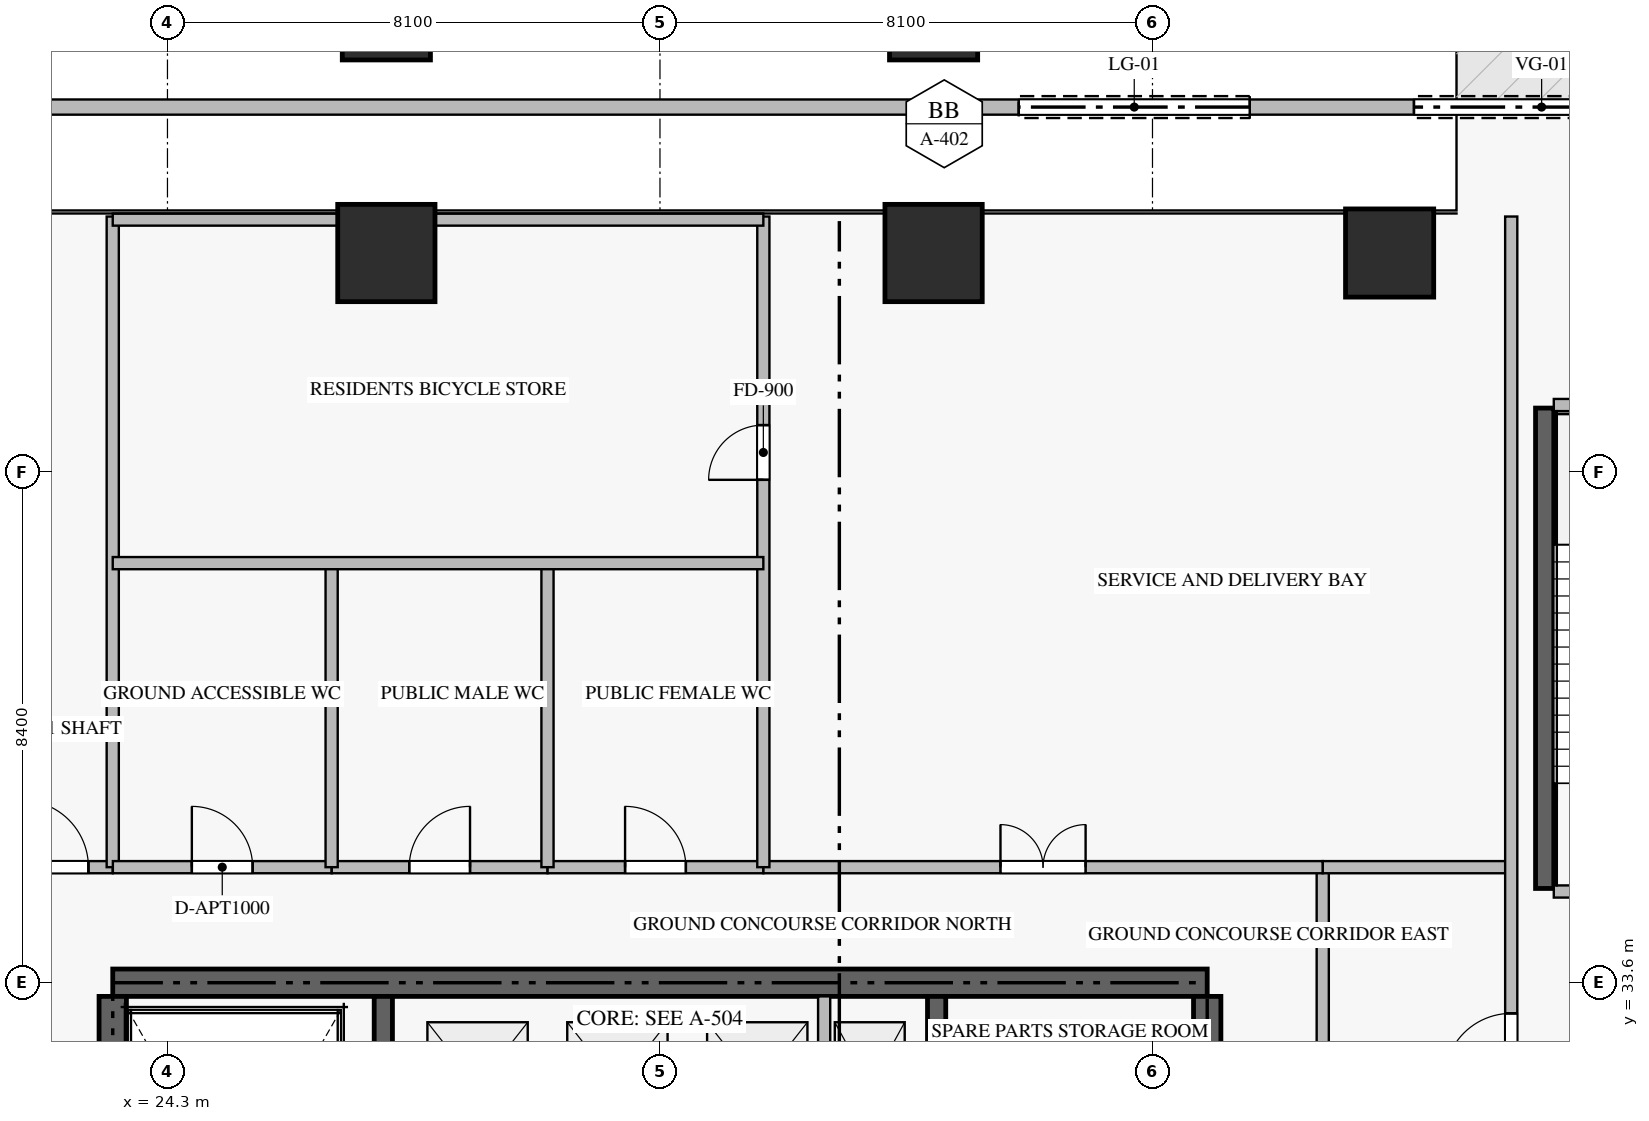
"""IFC4 building model, lengths in metres.
Left out: names, types, materials, properties, quantities, classifications, styles, units other than length and angle.
Written with IfcOpenShell. Run it as: python <this file> out.ifc"""

import sys

from ifc_helpers import new_model, si_unit, direction, frame, frame_2d, origin, origin_2d, place, context, subcontext, project, spatial, rectangle, extrude, source, transform, mapped, element, fill, save


model = new_model("IFC4")
c1 = context("Model", 3, precision=1e-05, world=origin(), true_north=direction((0.0, 1.0)))
c2 = subcontext(c1, "Body", "Model", "MODEL_VIEW")
j1 = project(units=[si_unit("LENGTHUNIT", "METRE"), si_unit("PLANEANGLEUNIT", "RADIAN")], contexts=[c1])
p1 = place(None, origin())
s1 = spatial("IfcSite", under=j1, at=p1, CompositionType="ELEMENT")
p2 = place(p1, origin())
s2 = spatial("IfcBuilding", under=s1, at=p2, CompositionType="ELEMENT")
p3 = place(p2, origin())
s3 = spatial("IfcBuildingStorey", under=s2, at=p3, CompositionType="ELEMENT", Elevation=0.0)
p4 = place(p3, frame((41.4, 33.6, -0.38), z_axis=(0.0, 0.0, 1.0), x_axis=(-1.0, 0.0, 0.0)))
e1 = element("IfcWall", 1, at=p4, inside=s3, PredefinedType="SHEAR", context=c2, shape_type="SweptSolid", body=[
    extrude(rectangle(XDim=18.0, YDim=0.45, at=frame_2d((9.0, 0.0))), origin(), (0.0, 0.0, 1.0), 5.498),
])
p5 = place(p3, frame((23.4, 24.25, -0.38), z_axis=(0.0, 0.0, 1.0), x_axis=(0.0, 1.0, 0.0)))
e2 = element("IfcWall", 2, at=p5, inside=s3, PredefinedType="SHEAR", context=c2, shape_type="SweptSolid", body=[
    extrude(rectangle(XDim=9.125, YDim=0.45, at=frame_2d((4.562, 0.0))), origin(), (0.0, 0.0, 1.0), 5.498),
])
p6 = place(p3, frame((41.4, 27.75, -0.38), z_axis=(0.0, 0.0, 1.0), x_axis=(0.0, 1.0, 0.0)))
e3 = element("IfcWall", 3, at=p6, inside=s3, PredefinedType="SHEAR", context=c2, shape_type="SweptSolid", body=[
    extrude(rectangle(XDim=5.625, YDim=0.45, at=frame_2d((2.812, 0.0))), origin(), (0.0, 0.0, 1.0), 5.498),
])
p7 = place(p3, frame((27.85, 23.55, -0.38), z_axis=(0.0, 0.0, 1.0), x_axis=(0.0, 1.0, 0.0)))
e4 = element("IfcWall", 4, at=p7, inside=s3, PredefinedType="SHEAR", context=c2, shape_type="SweptSolid", body=[
    extrude(rectangle(XDim=9.825, YDim=0.3, at=frame_2d((4.913, 0.0))), origin(), (0.0, 0.0, 1.0), 5.498),
])
p8 = place(p3, frame((36.95, 27.05, -0.38), z_axis=(0.0, 0.0, 1.0), x_axis=(0.0, 1.0, 0.0)))
e5 = element("IfcWall", 5, at=p8, inside=s3, PredefinedType="SHEAR", context=c2, shape_type="SweptSolid", body=[
    extrude(rectangle(XDim=6.325, YDim=0.3, at=frame_2d((3.163, 0.0))), origin(), (0.0, 0.0, 1.0), 5.498),
])
m1 = source(origin(), c2, "Body", "SweptSolid", [
    extrude(rectangle(XDim=1.6, YDim=1.6, at=origin_2d()), origin(), (0.0, 0.0, 1.0), 5.5),
])
for number, where, z_axis, x_axis in (
    (6, (27.9, 45.6, -0.38), (0.0, 0.0, 1.0), (1.0, 0.0, 0.0)),
    (7, (36.9, 45.6, -0.38), (0.0, 0.0, 1.0), (1.0, 0.0, 0.0)),
):
    element("IfcColumn", number, at=place(p3, frame(where, z_axis=z_axis, x_axis=x_axis)), inside=s3, PredefinedType="COLUMN", context=c2, shape_type="MappedRepresentation", body=[
        mapped(m1, transform((0.0, 0.0, 0.0), scale=1.0)),
    ])
m2 = source(origin(), c2, "Body", "SweptSolid", [
    extrude(rectangle(XDim=1.45, YDim=1.45, at=origin_2d()), origin(), (0.0, 0.0, 1.0), 5.5),
])
for number, where, z_axis, x_axis in (
    (8, (44.4, 45.6, -0.38), (0.0, 0.0, 1.0), (1.0, 0.0, 0.0)),
    (9, (27.9, 49.5, -0.38), (0.0, 0.0, 1.0), (1.0, 0.0, 0.0)),
    (10, (36.9, 49.5, -0.38), (0.0, 0.0, 1.0), (1.0, 0.0, 0.0)),
):
    element("IfcColumn", number, at=place(p3, frame(where, z_axis=z_axis, x_axis=x_axis)), inside=s3, PredefinedType="COLUMN", context=c2, shape_type="MappedRepresentation", body=[
        mapped(m2, transform((0.0, 0.0, 0.0), scale=1.0)),
    ])
p9 = place(p3, frame((56.825, 48.0, 0.0), z_axis=(0.0, 0.0, 1.0), x_axis=(-1.0, 0.0, 0.0)))
e11 = element("IfcWall", 11, at=p9, inside=s3, PredefinedType="ELEMENTEDWALL", context=c2, shape_type="SweptSolid", body=[
    extrude(rectangle(XDim=48.85, YDim=0.25, at=frame_2d((24.425, 0.0))), origin(), (0.0, 0.0, 1.0), 5.105),
])
p10 = place(p9, frame((7.825, 0.0, 0.0)))
e12 = element("IfcOpeningElement", 12, at=p10, cuts=e11, PredefinedType="OPENING", context=c2, shape_type="SweptSolid", body=[
    extrude(rectangle(XDim=4.2, YDim=3.1, at=frame_2d((2.1, 1.55))), frame((0.0, 0.135, 0.0), z_axis=(0.0, -1.0, 0.0), x_axis=(1.0, 0.0, 0.0)), (0.0, 0.0, 1.0), 0.27),
])
p11 = place(p9, frame((14.725, 0.0, 0.0)))
e13 = element("IfcOpeningElement", 13, at=p11, cuts=e11, PredefinedType="OPENING", context=c2, shape_type="SweptSolid", body=[
    extrude(rectangle(XDim=3.8, YDim=3.4, at=frame_2d((1.9, 1.7))), frame((0.0, 0.135, 0.0), z_axis=(0.0, -1.0, 0.0), x_axis=(1.0, 0.0, 0.0)), (0.0, 0.0, 1.0), 0.27),
])
p12 = place(p9, frame((38.825, 0.0, 0.0)))
e14 = element("IfcOpeningElement", 14, at=p12, cuts=e11, PredefinedType="OPENING", context=c2, shape_type="SweptSolid", body=[
    extrude(rectangle(XDim=1.8, YDim=2.3, at=frame_2d((0.9, 1.15))), frame((0.0, 0.135, 0.0), z_axis=(0.0, -1.0, 0.0), x_axis=(1.0, 0.0, 0.0)), (0.0, 0.0, 1.0), 0.27),
])
p13 = place(p9, frame((2.425, 0.0, 0.0)))
e15 = element("IfcOpeningElement", 15, at=p13, cuts=e11, PredefinedType="OPENING", context=c2, shape_type="SweptSolid", body=[
    extrude(rectangle(XDim=1.8, YDim=2.3, at=frame_2d((0.9, 1.15))), frame((0.0, 0.135, 0.0), z_axis=(0.0, -1.0, 0.0), x_axis=(1.0, 0.0, 0.0)), (0.0, 0.0, 1.0), 0.27),
])
p14 = place(p3, frame((46.95, 35.15, -0.38), z_axis=(0.0, 0.0, 1.0), x_axis=(0.0, 1.0, 0.0)))
e16 = element("IfcWall", 16, at=p14, inside=s3, PredefinedType="SHEAR", context=c2, shape_type="SweptSolid", body=[
    extrude(rectangle(XDim=7.9, YDim=0.3, at=frame_2d((3.95, 0.0))), origin(), (0.0, 0.0, 1.0), 5.498),
])
p15 = place(p3, frame((47.1, 35.1, 0.0), z_axis=(0.0, 0.0, 1.0), x_axis=(1.0, 0.0, 0.0)))
e17 = element("IfcWall", 17, at=p15, inside=s3, PredefinedType="STANDARD", context=c2, shape_type="SweptSolid", body=[
    extrude(rectangle(XDim=3.5, YDim=0.2, at=frame_2d((1.75, 0.0))), origin(), (0.0, 0.0, 1.0), 5.12),
])
p16 = place(p15, frame((1.2, 0.0, 0.0)))
e18 = element("IfcOpeningElement", 18, at=p16, cuts=e17, PredefinedType="OPENING", context=c2, shape_type="SweptSolid", body=[
    extrude(rectangle(XDim=1.1, YDim=2.15, at=frame_2d((0.55, 1.075))), frame((0.0, 0.11, 0.0), z_axis=(0.0, -1.0, 0.0), x_axis=(1.0, 0.0, 0.0)), (0.0, 0.0, 1.0), 0.22),
])
p17 = place(p3, frame((47.1, 43.1, 0.0), z_axis=(0.0, 0.0, 1.0), x_axis=(1.0, 0.0, 0.0)))
e19 = element("IfcWall", 19, at=p17, inside=s3, PredefinedType="STANDARD", context=c2, shape_type="SweptSolid", body=[
    extrude(rectangle(XDim=3.5, YDim=0.2, at=frame_2d((1.75, 0.0))), origin(), (0.0, 0.0, 1.0), 2.235),
])
p18 = place(p3, frame((35.1, 30.75, 0.0), z_axis=(0.0, 0.0, 1.0), x_axis=(0.0, 1.0, 0.0)))
e20 = element("IfcWall", 20, at=p18, inside=s3, PredefinedType="STANDARD", context=c2, shape_type="SweptSolid", body=[
    extrude(rectangle(XDim=2.625, YDim=0.2, at=frame_2d((1.312, 0.0))), origin(), (0.0, 0.0, 1.0), 5.12),
])
p19 = place(p3, frame((21.5, 35.5, 0.0), z_axis=(0.0, 0.0, 1.0), x_axis=(1.0, 0.0, 0.0)))
e21 = element("IfcWall", 21, at=p19, inside=s3, PredefinedType="STANDARD", context=c2, shape_type="SweptSolid", body=[
    extrude(rectangle(XDim=1.9, YDim=0.2, at=frame_2d((0.95, 0.0))), origin(), (0.0, 0.0, 1.0), 5.12),
])
p20 = place(p19, frame((0.4, 0.0, 0.0)))
e22 = element("IfcOpeningElement", 22, at=p20, cuts=e21, PredefinedType="OPENING", context=c2, shape_type="SweptSolid", body=[
    extrude(rectangle(XDim=1.1, YDim=2.15, at=frame_2d((0.55, 1.075))), frame((0.0, 0.11, 0.0), z_axis=(0.0, -1.0, 0.0), x_axis=(1.0, 0.0, 0.0)), (0.0, 0.0, 1.0), 0.22),
])
p21 = place(p3, frame((23.4, 35.5, 0.0), z_axis=(0.0, 0.0, 1.0), x_axis=(0.0, 1.0, 0.0)))
e23 = element("IfcWall", 23, at=p21, inside=s3, PredefinedType="STANDARD", context=c2, shape_type="SweptSolid", body=[
    extrude(rectangle(XDim=10.7, YDim=0.2, at=frame_2d((5.35, 0.0))), origin(), (0.0, 0.0, 1.0), 5.12),
])
p22 = place(p3, frame((43.3, 28.302, 0.0), z_axis=(0.0, 0.0, 1.0), x_axis=(0.0, 1.0, 0.0)))
e24 = element("IfcWall", 24, at=p22, inside=s3, PredefinedType="STANDARD", context=c2, shape_type="SweptSolid", body=[
    extrude(rectangle(XDim=7.198, YDim=0.2, at=frame_2d((3.599, 0.0))), origin(), (0.0, 0.0, 1.0), 5.12),
])
p23 = place(p22, frame((2.899, 0.0, 0.0)))
e25 = element("IfcOpeningElement", 25, at=p23, cuts=e24, PredefinedType="OPENING", context=c2, shape_type="SweptSolid", body=[
    extrude(rectangle(XDim=1.4, YDim=2.2, at=frame_2d((0.7, 1.1))), frame((0.0, 0.11, 0.0), z_axis=(0.0, -1.0, 0.0), x_axis=(1.0, 0.0, 0.0)), (0.0, 0.0, 1.0), 0.22),
])
p24 = place(p3, frame((43.3, 35.5, 0.0), z_axis=(0.0, 0.0, 1.0), x_axis=(1.0, 0.0, 0.0)))
e26 = element("IfcWall", 26, at=p24, inside=s3, PredefinedType="STANDARD", context=c2, shape_type="SweptSolid", body=[
    extrude(rectangle(XDim=3.1, YDim=0.2, at=frame_2d((1.55, 0.0))), origin(), (0.0, 0.0, 1.0), 5.12),
])
p25 = place(p3, frame((46.4, 28.3, 0.0), z_axis=(0.0, 0.0, 1.0), x_axis=(0.0, 1.0, 0.0)))
e27 = element("IfcWall", 27, at=p25, inside=s3, PredefinedType="STANDARD", context=c2, shape_type="SweptSolid", body=[
    extrude(rectangle(XDim=17.9, YDim=0.2, at=frame_2d((8.95, 0.0))), origin(), (0.0, 0.0, 1.0), 5.12),
])
p26 = place(p25, frame((3.696, 0.0, 0.0)))
e28 = element("IfcOpeningElement", 28, at=p26, cuts=e27, PredefinedType="OPENING", context=c2, shape_type="SweptSolid", body=[
    extrude(rectangle(XDim=1.1, YDim=2.15, at=frame_2d((0.55, 1.075))), frame((0.0, 0.11, 0.0), z_axis=(0.0, -1.0, 0.0), x_axis=(1.0, 0.0, 0.0)), (0.0, 0.0, 1.0), 0.22),
])
p27 = place(p3, frame((23.402, 35.5, 0.0), z_axis=(0.0, 0.0, 1.0), x_axis=(1.0, 0.0, 0.0)))
e29 = element("IfcWall", 29, at=p27, inside=s3, PredefinedType="STANDARD", context=c2, shape_type="SweptSolid", body=[
    extrude(rectangle(XDim=3.598, YDim=0.2, at=frame_2d((1.799, 0.0))), origin(), (0.0, 0.0, 1.0), 5.12),
])
p28 = place(p27, frame((1.299, 0.0, 0.0)))
e30 = element("IfcOpeningElement", 30, at=p28, cuts=e29, PredefinedType="OPENING", context=c2, shape_type="SweptSolid", body=[
    extrude(rectangle(XDim=1.0, YDim=2.15, at=frame_2d((0.5, 1.075))), frame((0.0, 0.11, 0.0), z_axis=(0.0, -1.0, 0.0), x_axis=(1.0, 0.0, 0.0)), (0.0, 0.0, 1.0), 0.22),
])
p29 = place(p3, frame((27.002, 35.5, 0.0), z_axis=(0.0, 0.0, 1.0), x_axis=(1.0, 0.0, 0.0)))
e31 = element("IfcWall", 31, at=p29, inside=s3, PredefinedType="STANDARD", context=c2, shape_type="SweptSolid", body=[
    extrude(rectangle(XDim=3.548, YDim=0.2, at=frame_2d((1.774, 0.0))), origin(), (0.0, 0.0, 1.0), 5.12),
])
p30 = place(p29, frame((1.274, 0.0, 0.0)))
e32 = element("IfcOpeningElement", 32, at=p30, cuts=e31, PredefinedType="OPENING", context=c2, shape_type="SweptSolid", body=[
    extrude(rectangle(XDim=1.0, YDim=2.15, at=frame_2d((0.5, 1.075))), frame((0.0, 0.11, 0.0), z_axis=(0.0, -1.0, 0.0), x_axis=(1.0, 0.0, 0.0)), (0.0, 0.0, 1.0), 0.22),
])
p31 = place(p3, frame((30.552, 35.5, 0.0), z_axis=(0.0, 0.0, 1.0), x_axis=(1.0, 0.0, 0.0)))
e33 = element("IfcWall", 33, at=p31, inside=s3, PredefinedType="STANDARD", context=c2, shape_type="SweptSolid", body=[
    extrude(rectangle(XDim=3.548, YDim=0.2, at=frame_2d((1.774, 0.0))), origin(), (0.0, 0.0, 1.0), 5.12),
])
p32 = place(p31, frame((1.274, 0.0, 0.0)))
e34 = element("IfcOpeningElement", 34, at=p32, cuts=e33, PredefinedType="OPENING", context=c2, shape_type="SweptSolid", body=[
    extrude(rectangle(XDim=1.0, YDim=2.15, at=frame_2d((0.5, 1.075))), frame((0.0, 0.11, 0.0), z_axis=(0.0, -1.0, 0.0), x_axis=(1.0, 0.0, 0.0)), (0.0, 0.0, 1.0), 0.22),
])
p33 = place(p3, frame((34.102, 35.5, 0.0), z_axis=(0.0, 0.0, 1.0), x_axis=(1.0, 0.0, 0.0)))
e35 = element("IfcWall", 35, at=p33, inside=s3, PredefinedType="STANDARD", context=c2, shape_type="SweptSolid", body=[
    extrude(rectangle(XDim=9.196, YDim=0.2, at=frame_2d((4.598, 0.0))), origin(), (0.0, 0.0, 1.0), 5.12),
])
p34 = place(p33, frame((3.898, 0.0, 0.0)))
e36 = element("IfcOpeningElement", 36, at=p34, cuts=e35, PredefinedType="OPENING", context=c2, shape_type="SweptSolid", body=[
    extrude(rectangle(XDim=1.4, YDim=2.2, at=frame_2d((0.7, 1.1))), frame((0.0, 0.11, 0.0), z_axis=(0.0, -1.0, 0.0), x_axis=(1.0, 0.0, 0.0)), (0.0, 0.0, 1.0), 0.22),
])
for number, where, z_axis, x_axis in (
    (37, (27.0, 35.5, 0.0), (0.0, 0.0, 1.0), (0.0, 1.0, 0.0)),
    (38, (30.55, 35.5, 0.0), (0.0, 0.0, 1.0), (0.0, 1.0, 0.0)),
):
    element("IfcWall", number, at=place(p3, frame(where, z_axis=z_axis, x_axis=x_axis)), inside=s3, PredefinedType="STANDARD", context=c2, shape_type="SweptSolid", body=[
        extrude(rectangle(XDim=5.0, YDim=0.2, at=frame_2d((2.5, 0.0))), origin(), (0.0, 0.0, 1.0), 5.12),
    ])
p35 = place(p3, frame((34.1, 35.5, 0.0), z_axis=(0.0, 0.0, 1.0), x_axis=(0.0, 1.0, 0.0)))
e39 = element("IfcWall", 39, at=p35, inside=s3, PredefinedType="STANDARD", context=c2, shape_type="SweptSolid", body=[
    extrude(rectangle(XDim=10.7, YDim=0.2, at=frame_2d((5.35, 0.0))), origin(), (0.0, 0.0, 1.0), 5.12),
])
p36 = place(p35, frame((6.37, 0.0, 0.0)))
e40 = element("IfcOpeningElement", 40, at=p36, cuts=e39, PredefinedType="OPENING", context=c2, shape_type="SweptSolid", body=[
    extrude(rectangle(XDim=0.9, YDim=2.1, at=frame_2d((0.45, 1.05))), frame((0.0, 0.11, 0.0), z_axis=(0.0, -1.0, 0.0), x_axis=(1.0, 0.0, 0.0)), (0.0, 0.0, 1.0), 0.22),
])
for number, where, z_axis, x_axis in (
    (41, (23.4, 40.5, 0.0), (0.0, 0.0, 1.0), (1.0, 0.0, 0.0)),
    (42, (23.4, 46.15, 0.0), (0.0, 0.0, 1.0), (1.0, 0.0, 0.0)),
):
    element("IfcWall", number, at=place(p3, frame(where, z_axis=z_axis, x_axis=x_axis)), inside=s3, PredefinedType="STANDARD", context=c2, shape_type="SweptSolid", body=[
        extrude(rectangle(XDim=10.7, YDim=0.2, at=frame_2d((5.35, 0.0))), origin(), (0.0, 0.0, 1.0), 5.12),
    ])
m3 = source(origin(), c2, "Body", "SweptSolid", [
    extrude(rectangle(XDim=4.2, YDim=3.1, at=frame_2d((2.1, 1.55))), frame((0.0, 0.025, 0.0), z_axis=(0.0, -1.0, 0.0), x_axis=(1.0, 0.0, 0.0)), (0.0, 0.0, 1.0), 0.05),
])
p37 = place(p10, origin())
e43 = element("IfcDoor", 43, at=p37, inside=s3, OperationType="ROLLINGUP", PredefinedType="GATE", context=c2, shape_type="MappedRepresentation", body=[
    mapped(m3, transform((0.0, 0.0, 0.0), scale=1.0)),
])
fill(e12, e43)
m4 = source(origin(), c2, "Body", "SweptSolid", [
    extrude(rectangle(XDim=3.8, YDim=3.4, at=frame_2d((1.9, 1.7))), frame((0.0, 0.025, 0.0), z_axis=(0.0, -1.0, 0.0), x_axis=(1.0, 0.0, 0.0)), (0.0, 0.0, 1.0), 0.05),
])
p38 = place(p11, origin())
e44 = element("IfcDoor", 44, at=p38, inside=s3, OperationType="ROLLINGUP", PredefinedType="GATE", context=c2, shape_type="MappedRepresentation", body=[
    mapped(m4, transform((0.0, 0.0, 0.0), scale=1.0)),
])
fill(e13, e44)
m5 = source(origin(), c2, "Body", "SweptSolid", [
    extrude(rectangle(XDim=1.1, YDim=2.15, at=frame_2d((0.55, 1.075))), frame((0.0, 0.025, 0.0), z_axis=(0.0, -1.0, 0.0), x_axis=(1.0, 0.0, 0.0)), (0.0, 0.0, 1.0), 0.05),
])
p39 = place(p20, origin())
e45 = element("IfcDoor", 45, at=p39, inside=s3, OperationType="SINGLE_SWING_LEFT", PredefinedType="DOOR", context=c2, shape_type="MappedRepresentation", body=[
    mapped(m5, transform((0.0, 0.0, 0.0), scale=1.0)),
])
fill(e22, e45)
p40 = place(p26, origin())
e46 = element("IfcDoor", 46, at=p40, inside=s3, OperationType="SINGLE_SWING_LEFT", PredefinedType="DOOR", context=c2, shape_type="MappedRepresentation", body=[
    mapped(m5, transform((0.0, 0.0, 0.0), scale=1.0)),
])
fill(e28, e46)
m6 = source(origin(), c2, "Body", "SweptSolid", [
    extrude(rectangle(XDim=1.0, YDim=2.15, at=frame_2d((0.5, 1.075))), frame((0.0, 0.025, 0.0), z_axis=(0.0, -1.0, 0.0), x_axis=(1.0, 0.0, 0.0)), (0.0, 0.0, 1.0), 0.05),
])
p41 = place(p28, origin())
e47 = element("IfcDoor", 47, at=p41, inside=s3, OperationType="SINGLE_SWING_LEFT", PredefinedType="DOOR", context=c2, shape_type="MappedRepresentation", body=[
    mapped(m6, transform((0.0, 0.0, 0.0), scale=1.0)),
])
fill(e30, e47)
p42 = place(p30, origin())
e48 = element("IfcDoor", 48, at=p42, inside=s3, OperationType="SINGLE_SWING_RIGHT", PredefinedType="DOOR", context=c2, shape_type="MappedRepresentation", body=[
    mapped(m6, transform((0.0, 0.0, 0.0), scale=1.0)),
])
fill(e32, e48)
p43 = place(p32, origin())
e49 = element("IfcDoor", 49, at=p43, inside=s3, OperationType="SINGLE_SWING_LEFT", PredefinedType="DOOR", context=c2, shape_type="MappedRepresentation", body=[
    mapped(m6, transform((0.0, 0.0, 0.0), scale=1.0)),
])
fill(e34, e49)
m7 = source(origin(), c2, "Body", "SweptSolid", [
    extrude(rectangle(XDim=1.4, YDim=2.2, at=frame_2d((0.7, 1.1))), frame((0.0, 0.025, 0.0), z_axis=(0.0, -1.0, 0.0), x_axis=(1.0, 0.0, 0.0)), (0.0, 0.0, 1.0), 0.05),
])
p44 = place(p34, origin())
e50 = element("IfcDoor", 50, at=p44, inside=s3, OperationType="DOUBLE_DOOR_SINGLE_SWING", PredefinedType="DOOR", context=c2, shape_type="MappedRepresentation", body=[
    mapped(m7, transform((0.0, 0.0, 0.0), scale=1.0)),
])
fill(e36, e50)
m8 = source(origin(), c2, "Body", "SweptSolid", [
    extrude(rectangle(XDim=0.9, YDim=2.1, at=frame_2d((0.45, 1.05))), frame((0.0, 0.025, 0.0), z_axis=(0.0, -1.0, 0.0), x_axis=(1.0, 0.0, 0.0)), (0.0, 0.0, 1.0), 0.05),
])
p45 = place(p36, origin())
e51 = element("IfcDoor", 51, at=p45, inside=s3, OperationType="SINGLE_SWING_LEFT", PredefinedType="DOOR", context=c2, shape_type="MappedRepresentation", body=[
    mapped(m8, transform((0.0, 0.0, 0.0), scale=1.0)),
])
fill(e40, e51)
save(model, sys.argv[1])
